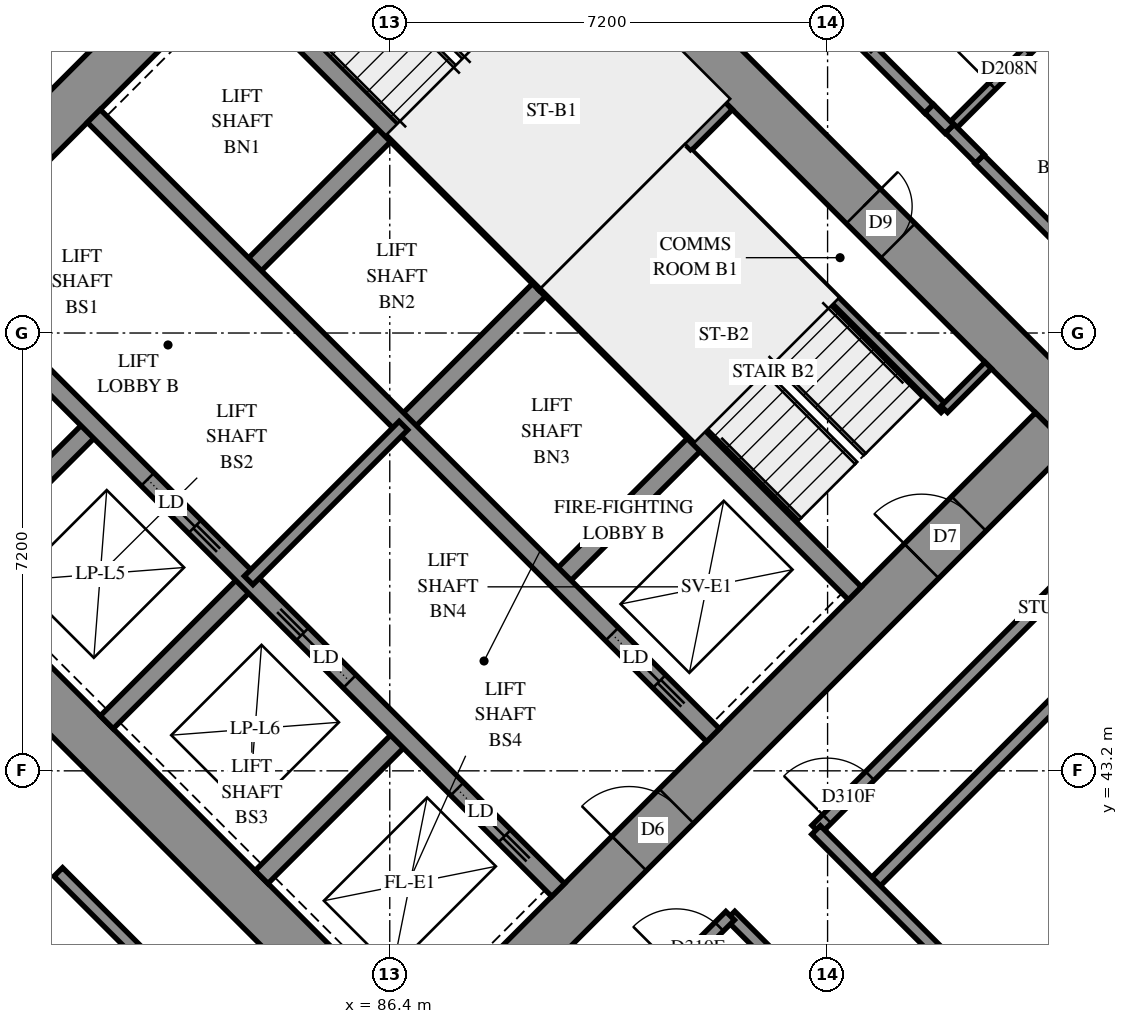
"""IFC4 building model, lengths in metres.
Left out: names, types, materials, properties, quantities, classifications, styles, units other than length and angle.
Written with IfcOpenShell. Run it as: python <this file> out.ifc"""

import sys

from ifc_helpers import new_model, si_unit, direction, frame, frame_2d, origin, place, context, subcontext, project, spatial, polyline, rectangle, outline, extrude, element, fill, save


model = new_model("IFC4")
c1 = context("Model", 3, precision=1e-05, world=origin(), true_north=direction((0.0, 1.0)))
c2 = subcontext(c1, "Body", "Model", "MODEL_VIEW")
j1 = project(units=[si_unit("LENGTHUNIT", "METRE"), si_unit("PLANEANGLEUNIT", "RADIAN")], contexts=[c1])
p1 = place(None, origin())
s1 = spatial("IfcSite", under=j1, at=p1, CompositionType="ELEMENT")
p2 = place(p1, origin())
s2 = spatial("IfcBuilding", under=s1, at=p2, CompositionType="ELEMENT")
p3 = place(p2, frame((0.0, 0.0, 101.6)))
s3 = spatial("IfcBuildingStorey", under=s2, at=p3, CompositionType="ELEMENT", Elevation=101.6)
p4 = place(p3, frame((75.806, 49.373, -0.3), z_axis=(0.0, 0.0, 1.0), x_axis=(0.7071067812, -0.7071067812, 0.0)))
e1 = element("IfcWall", 1, at=p4, inside=s3, PredefinedType="SHEAR", context=c2, shape_type="SweptSolid", body=[
    extrude(rectangle(XDim=16.0, YDim=0.8, at=frame_2d((8.0, 0.0))), origin(), (0.0, 0.0, 1.0), 2.7),
])
p5 = place(p3, frame((86.554, 60.121, -0.3), z_axis=(0.0, 0.0, 1.0), x_axis=(0.7071067812, -0.7071067812, 0.0)))
e2 = element("IfcWall", 2, at=p5, inside=s3, PredefinedType="SHEAR", context=c2, shape_type="SweptSolid", body=[
    extrude(rectangle(XDim=16.0, YDim=0.8, at=frame_2d((8.0, 0.0))), origin(), (0.0, 0.0, 1.0), 2.7),
])
p6 = place(p5, frame((10.8, 0.0, 0.3)))
e3 = element("IfcOpeningElement", 3, at=p6, cuts=e2, PredefinedType="OPENING", context=c2, shape_type="SweptSolid", body=[
    extrude(rectangle(XDim=0.8, YDim=2.1, at=frame_2d((0.4, 1.05))), frame((0.0, 0.41, 0.0), z_axis=(0.0, -1.0, 0.0), x_axis=(1.0, 0.0, 0.0)), (0.0, 0.0, 1.0), 0.82),
])
p7 = place(p3, frame((76.372, 49.373, -0.3), z_axis=(0.0, 0.0, 1.0), x_axis=(0.7071067812, 0.7071067812, 0.0)))
e4 = element("IfcWall", 4, at=p7, inside=s3, PredefinedType="SHEAR", context=c2, shape_type="SweptSolid", body=[
    extrude(rectangle(XDim=14.4, YDim=0.8, at=frame_2d((7.2, 0.0))), origin(), (0.0, 0.0, 1.0), 2.7),
])
p8 = place(p7, frame((4.55, 0.0, 0.3)))
e5 = element("IfcOpeningElement", 5, at=p8, cuts=e4, PredefinedType="OPENING", context=c2, shape_type="SweptSolid", body=[
    extrude(rectangle(XDim=1.1, YDim=2.1, at=frame_2d((0.55, 1.05))), frame((0.0, 0.41, 0.0), z_axis=(0.0, -1.0, 0.0), x_axis=(1.0, 0.0, 0.0)), (0.0, 0.0, 1.0), 0.82),
])
p9 = place(p7, frame((11.35, 0.0, 0.3)))
e6 = element("IfcOpeningElement", 6, at=p9, cuts=e4, PredefinedType="OPENING", context=c2, shape_type="SweptSolid", body=[
    extrude(rectangle(XDim=1.1, YDim=2.1, at=frame_2d((0.55, 1.05))), frame((0.0, 0.41, 0.0), z_axis=(0.0, -1.0, 0.0), x_axis=(1.0, 0.0, 0.0)), (0.0, 0.0, 1.0), 0.82),
])
p10 = place(p3, frame((87.12, 38.625, -0.3), z_axis=(0.0, 0.0, 1.0), x_axis=(0.7071067812, 0.7071067812, 0.0)))
e7 = element("IfcWall", 7, at=p10, inside=s3, PredefinedType="SHEAR", context=c2, shape_type="SweptSolid", body=[
    extrude(rectangle(XDim=14.4, YDim=0.8, at=frame_2d((7.2, 0.0))), origin(), (0.0, 0.0, 1.0), 2.7),
])
p11 = place(p10, frame((4.55, 0.0, 0.3)))
e8 = element("IfcOpeningElement", 8, at=p11, cuts=e7, PredefinedType="OPENING", context=c2, shape_type="SweptSolid", body=[
    extrude(rectangle(XDim=1.1, YDim=2.1, at=frame_2d((0.55, 1.05))), frame((0.0, 0.41, 0.0), z_axis=(0.0, -1.0, 0.0), x_axis=(1.0, 0.0, 0.0)), (0.0, 0.0, 1.0), 0.82),
])
p12 = place(p10, frame((11.35, 0.0, 0.3)))
e9 = element("IfcOpeningElement", 9, at=p12, cuts=e7, PredefinedType="OPENING", context=c2, shape_type="SweptSolid", body=[
    extrude(rectangle(XDim=1.1, YDim=2.1, at=frame_2d((0.55, 1.05))), frame((0.0, 0.41, 0.0), z_axis=(0.0, -1.0, 0.0), x_axis=(1.0, 0.0, 0.0)), (0.0, 0.0, 1.0), 0.82),
])
for number, where, z_axis, x_axis in (
    (10, (79.2, 46.544, 0.0), (0.0, 0.0, 1.0), (0.707, 0.707, 0.0)),
    (11, (84.079, 51.423, 0.0), (0.0, 0.0, 1.0), (0.707, 0.707, 0.0)),
):
    element("IfcWall", number, at=place(p3, frame(where, z_axis=z_axis, x_axis=x_axis)), inside=s3, PredefinedType="SOLIDWALL", context=c2, shape_type="SweptSolid", body=[
        extrude(rectangle(XDim=3.3, YDim=0.3, at=frame_2d((1.65, 0.0))), origin(), (0.0, 0.0, 1.0), 3.1),
    ])
p13 = place(p3, frame((81.746, 43.999, 0.0), z_axis=(0.0, 0.0, 1.0), x_axis=(0.7071067812, 0.7071067812, 0.0)))
e12 = element("IfcWall", 12, at=p13, inside=s3, PredefinedType="SOLIDWALL", context=c2, shape_type="SweptSolid", body=[
    extrude(rectangle(XDim=3.3, YDim=0.3, at=frame_2d((1.65, 0.0))), origin(), (0.0, 0.0, 1.0), 3.1),
])
p14 = place(p3, frame((86.625, 48.878, 0.0), z_axis=(0.0, 0.0, 1.0), x_axis=(0.7071067812, 0.7071067812, 0.0)))
e13 = element("IfcWall", 13, at=p14, inside=s3, PredefinedType="SOLIDWALL", context=c2, shape_type="SweptSolid", body=[
    extrude(rectangle(XDim=3.3, YDim=0.3, at=frame_2d((1.65, 0.0))), origin(), (0.0, 0.0, 1.0), 3.1),
])
p15 = place(p3, frame((84.291, 41.453, 0.0), z_axis=(0.0, 0.0, 1.0), x_axis=(0.7071067812, 0.7071067812, 0.0)))
e14 = element("IfcWall", 14, at=p15, inside=s3, PredefinedType="SOLIDWALL", context=c2, shape_type="SweptSolid", body=[
    extrude(rectangle(XDim=3.3, YDim=0.3, at=frame_2d((1.65, 0.0))), origin(), (0.0, 0.0, 1.0), 3.1),
])
p16 = place(p3, frame((89.17, 46.332, 0.0), z_axis=(0.0, 0.0, 1.0), x_axis=(0.7071067812, 0.7071067812, 0.0)))
e15 = element("IfcWall", 15, at=p16, inside=s3, PredefinedType="SOLIDWALL", context=c2, shape_type="SweptSolid", body=[
    extrude(rectangle(XDim=3.3, YDim=0.3, at=frame_2d((1.65, 0.0))), origin(), (0.0, 0.0, 1.0), 3.1),
])
p17 = place(p3, frame((78.988, 51.423, 0.0), z_axis=(0.0, 0.0, 1.0), x_axis=(0.7071067812, -0.7071067812, 0.0)))
e16 = element("IfcWall", 16, at=p17, inside=s3, PredefinedType="SOLIDWALL", context=c2, shape_type="SweptSolid", body=[
    extrude(rectangle(XDim=14.4, YDim=0.3, at=frame_2d((7.2, 0.0))), origin(), (0.0, 0.0, 1.0), 3.1),
])
p18 = place(p17, frame((1.25, 0.0, 0.0)))
e17 = element("IfcOpeningElement", 17, at=p18, cuts=e16, PredefinedType="OPENING", context=c2, shape_type="SweptSolid", body=[
    extrude(rectangle(XDim=1.1, YDim=2.1, at=frame_2d((0.55, 1.05))), frame((0.0, 0.16, 0.0), z_axis=(0.0, -1.0, 0.0), x_axis=(1.0, 0.0, 0.0)), (0.0, 0.0, 1.0), 0.32),
])
p19 = place(p17, frame((4.85, 0.0, 0.0)))
e18 = element("IfcOpeningElement", 18, at=p19, cuts=e16, PredefinedType="OPENING", context=c2, shape_type="SweptSolid", body=[
    extrude(rectangle(XDim=1.1, YDim=2.1, at=frame_2d((0.55, 1.05))), frame((0.0, 0.16, 0.0), z_axis=(0.0, -1.0, 0.0), x_axis=(1.0, 0.0, 0.0)), (0.0, 0.0, 1.0), 0.32),
])
p20 = place(p17, frame((8.45, 0.0, 0.0)))
e19 = element("IfcOpeningElement", 19, at=p20, cuts=e16, PredefinedType="OPENING", context=c2, shape_type="SweptSolid", body=[
    extrude(rectangle(XDim=1.1, YDim=2.1, at=frame_2d((0.55, 1.05))), frame((0.0, 0.16, 0.0), z_axis=(0.0, -1.0, 0.0), x_axis=(1.0, 0.0, 0.0)), (0.0, 0.0, 1.0), 0.32),
])
p21 = place(p17, frame((12.05, 0.0, 0.0)))
e20 = element("IfcOpeningElement", 20, at=p21, cuts=e16, PredefinedType="OPENING", context=c2, shape_type="SweptSolid", body=[
    extrude(rectangle(XDim=1.1, YDim=2.1, at=frame_2d((0.55, 1.05))), frame((0.0, 0.16, 0.0), z_axis=(0.0, -1.0, 0.0), x_axis=(1.0, 0.0, 0.0)), (0.0, 0.0, 1.0), 0.32),
])
p22 = place(p3, frame((81.534, 53.969, 0.0), z_axis=(0.0, 0.0, 1.0), x_axis=(0.707103309, -0.7071102534, 0.0)))
e21 = element("IfcWall", 21, at=p22, inside=s3, PredefinedType="SOLIDWALL", context=c2, shape_type="SweptSolid", body=[
    extrude(rectangle(XDim=14.4, YDim=0.3, at=frame_2d((7.2, 0.0))), origin(), (0.0, 0.0, 1.0), 3.1),
])
p23 = place(p22, frame((12.05, 0.0, 0.0)))
e22 = element("IfcOpeningElement", 22, at=p23, cuts=e21, PredefinedType="OPENING", context=c2, shape_type="SweptSolid", body=[
    extrude(rectangle(XDim=1.1, YDim=2.1, at=frame_2d((0.55, 1.05))), frame((0.0, 0.16, 0.0), z_axis=(0.0, -1.0, 0.0), x_axis=(1.0, 0.0, 0.0)), (0.0, 0.0, 1.0), 0.32),
])
for number, where, z_axis, x_axis in (
    (23, (83.867, 56.302, 0.0), (0.0, 0.0, 1.0), (0.707, -0.707, 0.0)),
    (24, (88.958, 51.211, 0.0), (0.0, 0.0, 1.0), (0.707, -0.707, 0.0)),
):
    element("IfcWall", number, at=place(p3, frame(where, z_axis=z_axis, x_axis=x_axis)), inside=s3, PredefinedType="SOLIDWALL", context=c2, shape_type="SweptSolid", body=[
        extrude(rectangle(XDim=7.2, YDim=0.3, at=frame_2d((3.6, 0.0))), origin(), (0.0, 0.0, 1.0), 3.1),
    ])
p24 = place(p3, frame((88.958, 51.211, 0.0), z_axis=(0.0, 0.0, 1.0), x_axis=(0.7071067812, 0.7071067812, 0.0)))
e25 = element("IfcWall", 25, at=p24, inside=s3, PredefinedType="SOLIDWALL", context=c2, shape_type="SweptSolid", body=[
    extrude(rectangle(XDim=4.2, YDim=0.3, at=frame_2d((2.1, 0.0))), origin(), (0.0, 0.0, 1.0), 3.1),
])
p25 = place(p3, frame((98.817, 54.369, 0.0), z_axis=(0.0, 0.0, 1.0), x_axis=(-0.7990967254, 0.6012024813, 0.0)))
e26 = element("IfcWall", 26, at=p25, inside=s3, PredefinedType="SOLIDWALL", context=c2, shape_type="SweptSolid", body=[
    extrude(outline(polyline([(-0.039, -0.275), (3.405, -0.275), (3.483, 0.275), (0.039, 0.275), (-0.039, -0.275)])), origin(), (0.0, 0.0, 1.0), 3.1),
])
p26 = place(p25, frame((0.423, 0.0, 0.5)))
e27 = element("IfcOpeningElement", 27, at=p26, cuts=e26, PredefinedType="OPENING", context=c2, shape_type="SweptSolid", body=[
    extrude(rectangle(XDim=1.2, YDim=2.45, at=frame_2d((0.6, 1.225))), frame((0.0, 0.285, 0.0), z_axis=(0.0, -1.0, 0.0), x_axis=(1.0, 0.0, 0.0)), (0.0, 0.0, 1.0), 0.57),
])
p27 = place(p25, frame((2.095, 0.0, 0.45)))
e28 = element("IfcOpeningElement", 28, at=p27, cuts=e26, PredefinedType="OPENING", context=c2, shape_type="SweptSolid", body=[
    extrude(rectangle(XDim=1.0, YDim=2.5, at=frame_2d((0.5, 1.25))), frame((0.0, 0.285, 0.0), z_axis=(0.0, -1.0, 0.0), x_axis=(1.0, 0.0, 0.0)), (0.0, 0.0, 1.0), 0.57),
])
p28 = place(p3, frame((91.313, 53.354, 0.0), z_axis=(0.0, 0.0, 1.0), x_axis=(0.7071067812, -0.7071067812, 0.0)))
e29 = element("IfcWall", 29, at=p28, inside=s3, PredefinedType="PARTITIONING", context=c2, shape_type="SweptSolid", body=[
    extrude(rectangle(XDim=5.95, YDim=0.15, at=frame_2d((2.975, 0.0))), origin(), (0.0, 0.0, 1.0), 3.1),
])
p29 = place(p3, frame((95.52, 49.146, 0.0), z_axis=(0.0, 0.0, 1.0), x_axis=(0.7071067812, 0.7071067812, 0.0)))
e30 = element("IfcWall", 30, at=p29, inside=s3, PredefinedType="PARTITIONING", context=c2, shape_type="SweptSolid", body=[
    extrude(rectangle(XDim=1.02, YDim=0.15, at=frame_2d((0.51, 0.0))), origin(), (0.0, 0.0, 1.0), 3.1),
])
p30 = place(p3, frame((84.079, 46.332, 0.0), z_axis=(0.0, 0.0, 1.0), x_axis=(0.7071067812, 0.7071067812, 0.0)))
e31 = element("IfcWall", 31, at=p30, inside=s3, PredefinedType="PARTITIONING", context=c2, shape_type="SweptSolid", body=[
    extrude(rectangle(XDim=3.6, YDim=0.2, at=frame_2d((1.8, 0.0))), origin(), (0.0, 0.0, 1.0), 3.1),
])
p31 = place(p3, frame((92.004, 40.819, 0.0), z_axis=(0.0, 0.0, 1.0), x_axis=(0.7071067812, -0.7071067812, 0.0)))
e32 = element("IfcWall", 32, at=p31, inside=s3, PredefinedType="PARTITIONING", context=c2, shape_type="SweptSolid", body=[
    extrude(rectangle(XDim=19.298, YDim=0.2, at=frame_2d((9.649, 0.0))), origin(), (0.0, 0.0, 1.0), 3.1),
])
p32 = place(p31, frame((3.489, 0.0, 0.0)))
e33 = element("IfcOpeningElement", 33, at=p32, cuts=e32, PredefinedType="OPENING", context=c2, shape_type="SweptSolid", body=[
    extrude(rectangle(XDim=0.9, YDim=2.1, at=frame_2d((0.45, 1.05))), frame((0.0, 0.11, 0.0), z_axis=(0.0, -1.0, 0.0), x_axis=(1.0, 0.0, 0.0)), (0.0, 0.0, 1.0), 0.22),
])
p33 = place(p31, frame((9.319, 0.0, 0.0)))
e34 = element("IfcOpeningElement", 34, at=p33, cuts=e32, PredefinedType="OPENING", context=c2, shape_type="SweptSolid", body=[
    extrude(rectangle(XDim=0.9, YDim=2.1, at=frame_2d((0.45, 1.05))), frame((0.0, 0.11, 0.0), z_axis=(0.0, -1.0, 0.0), x_axis=(1.0, 0.0, 0.0)), (0.0, 0.0, 1.0), 0.22),
])
p34 = place(p31, frame((15.961, 0.0, 0.0)))
e35 = element("IfcOpeningElement", 35, at=p34, cuts=e32, PredefinedType="OPENING", context=c2, shape_type="SweptSolid", body=[
    extrude(rectangle(XDim=0.9, YDim=2.1, at=frame_2d((0.45, 1.05))), frame((0.0, 0.11, 0.0), z_axis=(0.0, -1.0, 0.0), x_axis=(1.0, 0.0, 0.0)), (0.0, 0.0, 1.0), 0.22),
])
p35 = place(p3, frame((94.331, 41.313, 0.0), z_axis=(0.0, 0.0, 1.0), x_axis=(0.7071109413, 0.7071026211, 0.0)))
e36 = element("IfcWall", 36, at=p35, inside=s3, PredefinedType="PARTITIONING", context=c2, shape_type="SweptSolid", body=[
    extrude(rectangle(XDim=12.019, YDim=0.2, at=frame_2d((6.01, 0.0))), origin(), (0.0, 0.0, 1.0), 3.1),
])
p36 = place(p3, frame((87.894, 61.461, 0.0), z_axis=(0.0, 0.0, 1.0), x_axis=(0.7071067812, -0.7071067812, 0.0)))
e37 = element("IfcWall", 37, at=p36, inside=s3, PredefinedType="PARTITIONING", context=c2, shape_type="SweptSolid", body=[
    extrude(rectangle(XDim=10.428, YDim=0.2, at=frame_2d((5.214, 0.0))), origin(), (0.0, 0.0, 1.0), 3.1),
])
p37 = place(p36, frame((6.39, 0.0, 0.0)))
e38 = element("IfcOpeningElement", 38, at=p37, cuts=e37, PredefinedType="OPENING", context=c2, shape_type="SweptSolid", body=[
    extrude(rectangle(XDim=0.9, YDim=2.1, at=frame_2d((0.45, 1.05))), frame((0.0, 0.11, 0.0), z_axis=(0.0, -1.0, 0.0), x_axis=(1.0, 0.0, 0.0)), (0.0, 0.0, 1.0), 0.22),
])
p38 = place(p3, frame((93.413, 42.233, 0.0), z_axis=(0.0, 0.0, 1.0), x_axis=(0.7071067812, 0.7071067812, 0.0)))
e39 = element("IfcWall", 39, at=p38, inside=s3, PredefinedType="PARTITIONING", context=c2, shape_type="SweptSolid", body=[
    extrude(rectangle(XDim=9.699, YDim=0.2, at=frame_2d((4.849, 0.0))), origin(), (0.0, 0.0, 1.0), 3.1),
])
p39 = place(p38, frame((0.249, 0.0, 0.0)))
e40 = element("IfcOpeningElement", 40, at=p39, cuts=e39, PredefinedType="OPENING", context=c2, shape_type="SweptSolid", body=[
    extrude(rectangle(XDim=1.0, YDim=2.1, at=frame_2d((0.5, 1.05))), frame((0.0, 0.11, 0.0), z_axis=(0.0, -1.0, 0.0), x_axis=(1.0, 0.0, 0.0)), (0.0, 0.0, 1.0), 0.22),
])
p40 = place(p3, frame((93.411, 42.227, 0.0), z_axis=(0.0, 0.0, 1.0), x_axis=(0.7071067812, -0.7071067812, 0.0)))
e41 = element("IfcWall", 41, at=p40, inside=s3, PredefinedType="PARTITIONING", context=c2, shape_type="SweptSolid", body=[
    extrude(rectangle(XDim=8.499, YDim=0.2, at=frame_2d((4.25, 0.0))), origin(), (0.0, 0.0, 1.0), 3.1),
])
p41 = place(p40, frame((3.672, 0.0, 0.0)))
e42 = element("IfcOpeningElement", 42, at=p41, cuts=e41, PredefinedType="OPENING", context=c2, shape_type="SweptSolid", body=[
    extrude(rectangle(XDim=1.0, YDim=2.1, at=frame_2d((0.5, 1.05))), frame((0.0, 0.11, 0.0), z_axis=(0.0, -1.0, 0.0), x_axis=(1.0, 0.0, 0.0)), (0.0, 0.0, 1.0), 0.22),
])
p42 = place(p3, frame((86.835, 35.655, 0.0), z_axis=(0.0, 0.0, 1.0), x_axis=(0.7071067812, 0.7071067812, 0.0)))
e43 = element("IfcWall", 43, at=p42, inside=s3, PredefinedType="PARTITIONING", context=c2, shape_type="SweptSolid", body=[
    extrude(rectangle(XDim=7.3, YDim=0.2, at=frame_2d((3.65, 0.0))), origin(), (0.0, 0.0, 1.0), 3.1),
])
p43 = place(p42, frame((6.046, 0.0, 0.0)))
e44 = element("IfcOpeningElement", 44, at=p43, cuts=e43, PredefinedType="OPENING", context=c2, shape_type="SweptSolid", body=[
    extrude(rectangle(XDim=1.0, YDim=2.1, at=frame_2d((0.5, 1.05))), frame((0.0, 0.11, 0.0), z_axis=(0.0, -1.0, 0.0), x_axis=(1.0, 0.0, 0.0)), (0.0, 0.0, 1.0), 0.22),
])
p44 = place(p3, frame((80.948, 41.536, 0.0), z_axis=(0.0, 0.0, 1.0), x_axis=(0.7071067812, -0.7071067812, 0.0)))
e45 = element("IfcWall", 45, at=p44, inside=s3, PredefinedType="PARTITIONING", context=c2, shape_type="SweptSolid", body=[
    extrude(rectangle(XDim=6.822, YDim=0.2, at=frame_2d((3.411, 0.0))), origin(), (0.0, 0.0, 1.0), 3.1),
])
p45 = place(p3, frame((96.097, 53.258, 0.0), z_axis=(0.0, 0.0, 1.0), x_axis=(0.7071067812, -0.7071067812, 0.0)))
e46 = element("IfcWall", 46, at=p45, inside=s3, PredefinedType="PARTITIONING", context=c2, shape_type="SweptSolid", body=[
    extrude(rectangle(XDim=5.9, YDim=0.2, at=frame_2d((2.95, 0.0))), origin(), (0.0, 0.0, 1.0), 3.1),
])
p46 = place(p45, frame((2.006, 0.0, 0.0)))
e47 = element("IfcOpeningElement", 47, at=p46, cuts=e46, PredefinedType="OPENING", context=c2, shape_type="SweptSolid", body=[
    extrude(rectangle(XDim=0.9, YDim=2.1, at=frame_2d((0.45, 1.05))), frame((0.0, 0.11, 0.0), z_axis=(0.0, -1.0, 0.0), x_axis=(1.0, 0.0, 0.0)), (0.0, 0.0, 1.0), 0.22),
])
p47 = place(p3, frame((95.605, 53.759, 0.0), z_axis=(0.0, 0.0, 1.0), x_axis=(0.7071067812, 0.7071067812, 0.0)))
e48 = element("IfcWall", 48, at=p47, inside=s3, PredefinedType="PARTITIONING", context=c2, shape_type="SweptSolid", body=[
    extrude(rectangle(XDim=2.165, YDim=0.15, at=frame_2d((1.082, 0.0))), origin(), (0.0, 0.0, 1.0), 3.1),
])
p48 = place(p47, frame((0.997, 0.0, 0.0)))
e49 = element("IfcOpeningElement", 49, at=p48, cuts=e48, PredefinedType="OPENING", context=c2, shape_type="SweptSolid", body=[
    extrude(rectangle(XDim=0.8, YDim=2.1, at=frame_2d((0.4, 1.05))), frame((0.0, 0.085, 0.0), z_axis=(0.0, -1.0, 0.0), x_axis=(1.0, 0.0, 0.0)), (0.0, 0.0, 1.0), 0.17),
])
p49 = place(p3, frame((95.609, 53.761, 0.0), z_axis=(0.0, 0.0, 1.0), x_axis=(0.7056768426, -0.7085338339, 0.0)))
e50 = element("IfcWall", 50, at=p49, inside=s3, PredefinedType="PARTITIONING", context=c2, shape_type="SweptSolid", body=[
    extrude(rectangle(XDim=0.7, YDim=0.2, at=frame_2d((0.35, 0.0))), origin(), (0.0, 0.0, 1.0), 3.1),
])
p50 = place(p3, frame((95.271, 54.089, 0.0), z_axis=(0.0, 0.0, 1.0), x_axis=(0.7049801586, -0.7092270271, 0.0)))
e51 = element("IfcWall", 51, at=p50, inside=s3, PredefinedType="PARTITIONING", context=c2, shape_type="SweptSolid", body=[
    extrude(rectangle(XDim=0.471, YDim=0.2, at=frame_2d((0.235, 0.0))), origin(), (0.0, 0.0, 1.0), 3.1),
])
p51 = place(p6, origin())
e52 = element("IfcDoor", 52, at=p51, inside=s3, OperationType="SINGLE_SWING_RIGHT", PredefinedType="DOOR", context=c2, shape_type="SweptSolid", body=[
    extrude(rectangle(XDim=0.8, YDim=2.1, at=frame_2d((0.4, 1.05))), frame((0.0, -0.34, 0.0), z_axis=(0.0, -1.0, 0.0), x_axis=(1.0, 0.0, 0.0)), (0.0, 0.0, 1.0), 0.05),
])
fill(e3, e52)
p52 = place(p11, origin())
e53 = element("IfcDoor", 53, at=p52, inside=s3, OperationType="DOUBLE_DOOR_SINGLE_SWING", PredefinedType="DOOR", context=c2, shape_type="SweptSolid", body=[
    extrude(rectangle(XDim=1.1, YDim=2.1, at=frame_2d((0.55, 1.05))), frame((0.0, 0.025, 0.0), z_axis=(0.0, -1.0, 0.0), x_axis=(1.0, 0.0, 0.0)), (0.0, 0.0, 1.0), 0.05),
])
fill(e8, e53)
p53 = place(p12, origin())
e54 = element("IfcDoor", 54, at=p53, inside=s3, OperationType="SINGLE_SWING_RIGHT", PredefinedType="DOOR", context=c2, shape_type="SweptSolid", body=[
    extrude(rectangle(XDim=1.1, YDim=2.1, at=frame_2d((0.55, 1.05))), frame((0.0, 0.025, 0.0), z_axis=(0.0, -1.0, 0.0), x_axis=(1.0, 0.0, 0.0)), (0.0, 0.0, 1.0), 0.05),
])
fill(e9, e54)
p54 = place(p19, origin())
e55 = element("IfcDoor", 55, at=p54, inside=s3, OperationType="SLIDING_TO_RIGHT", PredefinedType="DOOR", context=c2, shape_type="SweptSolid", body=[
    extrude(rectangle(XDim=1.1, YDim=2.1, at=frame_2d((0.55, 1.05))), frame((0.0, 0.025, 0.0), z_axis=(0.0, -1.0, 0.0), x_axis=(1.0, 0.0, 0.0)), (0.0, 0.0, 1.0), 0.05),
])
fill(e18, e55)
p55 = place(p20, origin())
e56 = element("IfcDoor", 56, at=p55, inside=s3, OperationType="SLIDING_TO_LEFT", PredefinedType="DOOR", context=c2, shape_type="SweptSolid", body=[
    extrude(rectangle(XDim=1.1, YDim=2.1, at=frame_2d((0.55, 1.05))), frame((0.0, 0.025, 0.0), z_axis=(0.0, -1.0, 0.0), x_axis=(1.0, 0.0, 0.0)), (0.0, 0.0, 1.0), 0.05),
])
fill(e19, e56)
p56 = place(p21, origin())
e57 = element("IfcDoor", 57, at=p56, inside=s3, OperationType="SLIDING_TO_RIGHT", PredefinedType="DOOR", context=c2, shape_type="SweptSolid", body=[
    extrude(rectangle(XDim=1.1, YDim=2.1, at=frame_2d((0.55, 1.05))), frame((0.0, 0.025, 0.0), z_axis=(0.0, -1.0, 0.0), x_axis=(1.0, 0.0, 0.0)), (0.0, 0.0, 1.0), 0.05),
])
fill(e20, e57)
p57 = place(p23, origin())
e58 = element("IfcDoor", 58, at=p57, inside=s3, OperationType="SLIDING_TO_RIGHT", PredefinedType="DOOR", context=c2, shape_type="SweptSolid", body=[
    extrude(rectangle(XDim=1.1, YDim=2.1, at=frame_2d((0.55, 1.05))), frame((0.0, 0.025, 0.0), z_axis=(0.0, -1.0, 0.0), x_axis=(1.0, 0.0, 0.0)), (0.0, 0.0, 1.0), 0.05),
])
fill(e22, e58)
p58 = place(p48, origin())
e59 = element("IfcDoor", 59, at=p58, inside=s3, OperationType="SINGLE_SWING_RIGHT", PredefinedType="DOOR", context=c2, shape_type="SweptSolid", body=[
    extrude(rectangle(XDim=0.8, YDim=2.1, at=frame_2d((0.4, 1.05))), frame((0.0, 0.025, 0.0), z_axis=(0.0, -1.0, 0.0), x_axis=(1.0, 0.0, 0.0)), (0.0, 0.0, 1.0), 0.05),
])
fill(e49, e59)
p59 = place(p39, origin())
e60 = element("IfcDoor", 60, at=p59, inside=s3, OperationType="SINGLE_SWING_LEFT", PredefinedType="DOOR", context=c2, shape_type="SweptSolid", body=[
    extrude(rectangle(XDim=1.0, YDim=2.1, at=frame_2d((0.5, 1.05))), frame((0.0, 0.025, 0.0), z_axis=(0.0, -1.0, 0.0), x_axis=(1.0, 0.0, 0.0)), (0.0, 0.0, 1.0), 0.05),
])
fill(e40, e60)
p60 = place(p43, origin())
e61 = element("IfcDoor", 61, at=p60, inside=s3, OperationType="SINGLE_SWING_RIGHT", PredefinedType="DOOR", context=c2, shape_type="SweptSolid", body=[
    extrude(rectangle(XDim=1.0, YDim=2.1, at=frame_2d((0.5, 1.05))), frame((0.0, 0.025, 0.0), z_axis=(0.0, -1.0, 0.0), x_axis=(1.0, 0.0, 0.0)), (0.0, 0.0, 1.0), 0.05),
])
fill(e44, e61)
save(model, sys.argv[1])
